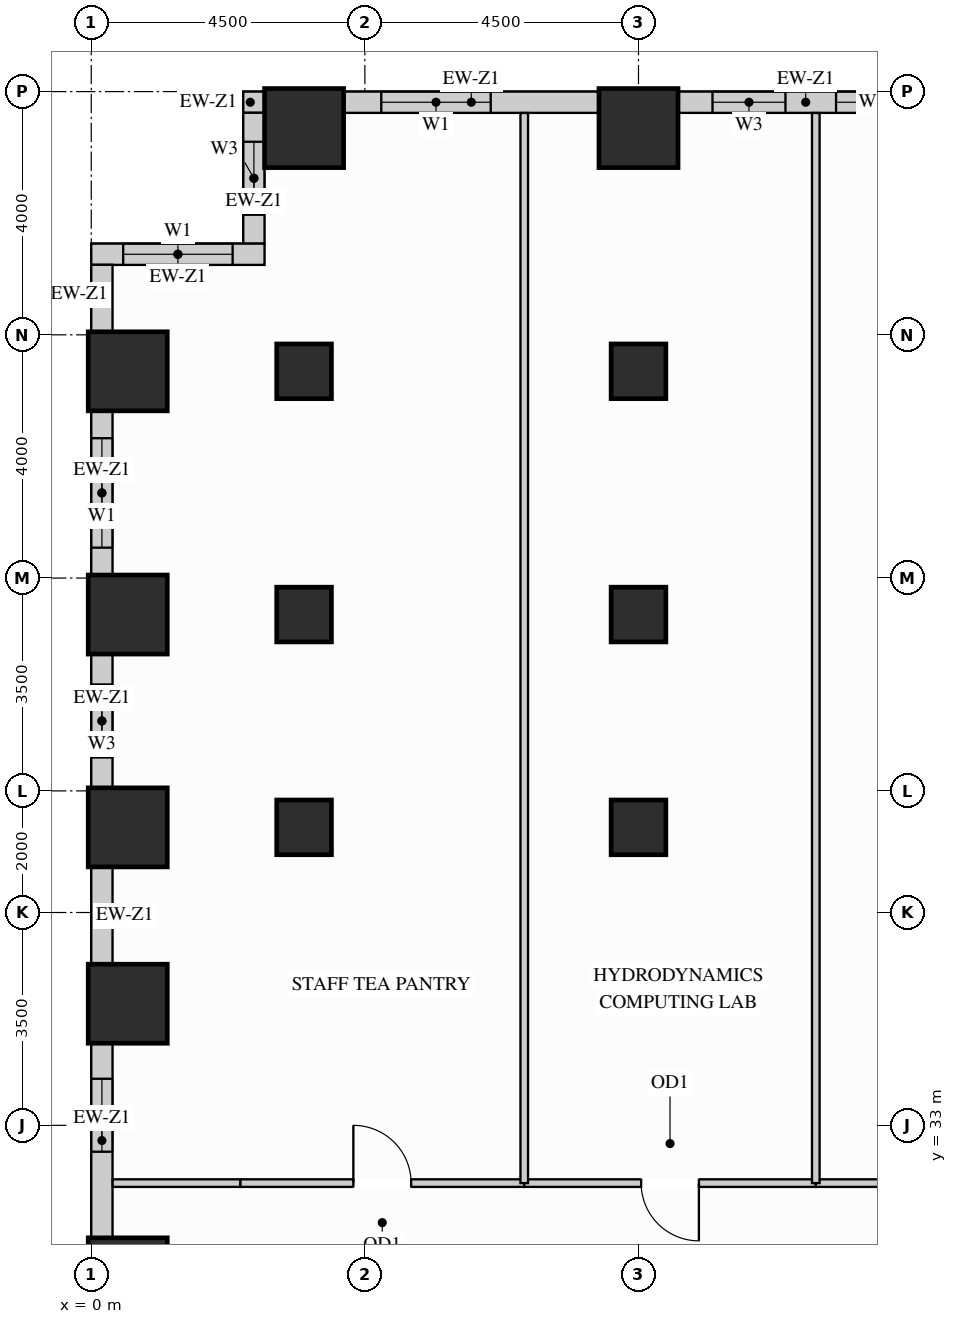
"""IFC4 building model, lengths in metres.
Left out: names, types, materials, properties, quantities, classifications, styles, units other than length and angle.
Written with IfcOpenShell. Run it as: python <this file> out.ifc"""

import sys

from ifc_helpers import new_model, si_unit, direction, frame, frame_2d, origin, origin_2d, place, context, subcontext, project, spatial, rectangle, extrude, source, transform, mapped, element, fill, save


model = new_model("IFC4")
c1 = context("Model", 3, precision=1e-05, world=origin(), true_north=direction((0.0, 1.0)))
c2 = subcontext(c1, "Body", "Model", "MODEL_VIEW")
j1 = project(units=[si_unit("LENGTHUNIT", "METRE"), si_unit("PLANEANGLEUNIT", "RADIAN")], contexts=[c1])
p1 = place(None, origin())
s1 = spatial("IfcSite", under=j1, at=p1, CompositionType="ELEMENT")
p2 = place(p1, origin())
s2 = spatial("IfcBuilding", under=s1, at=p2, CompositionType="ELEMENT")
p3 = place(p2, frame((0.0, 0.0, 36.9)))
s3 = spatial("IfcBuildingStorey", under=s2, at=p3, CompositionType="ELEMENT", Elevation=36.9)
m1 = source(origin(), c2, "Body", "SweptSolid", [
    extrude(rectangle(XDim=0.9, YDim=0.9, at=origin_2d()), origin(), (0.0, 0.0, 1.0), 3.38),
])
for number, where, z_axis, x_axis in (
    (1, (3.5, 37.9, 0.0), (0.0, 0.0, 1.0), (1.0, 0.0, 0.0)),
    (2, (3.5, 41.4, 0.0), (0.0, 0.0, 1.0), (1.0, 0.0, 0.0)),
    (3, (3.5, 45.4, 0.0), (0.0, 0.0, 1.0), (1.0, 0.0, 0.0)),
    (4, (9.0, 37.9, 0.0), (0.0, 0.0, 1.0), (1.0, 0.0, 0.0)),
    (5, (9.0, 41.4, 0.0), (0.0, 0.0, 1.0), (1.0, 0.0, 0.0)),
    (6, (9.0, 45.4, 0.0), (0.0, 0.0, 1.0), (1.0, 0.0, 0.0)),
):
    element("IfcColumn", number, at=place(p3, frame(where, z_axis=z_axis, x_axis=x_axis)), inside=s3, PredefinedType="COLUMN", context=c2, shape_type="MappedRepresentation", body=[
        mapped(m1, transform((0.0, 0.0, 0.0), x_axis=(1.0, 0.0, 0.0), y_axis=(0.0, 1.0, 0.0), z_axis=(0.0, 0.0, 1.0))),
    ])
m2 = source(origin(), c2, "Body", "SweptSolid", [
    extrude(rectangle(XDim=1.3, YDim=1.3, at=origin_2d()), origin(), (0.0, 0.0, 1.0), 3.38),
])
for number, where, z_axis, x_axis in (
    (7, (3.5, 49.4, 0.0), (0.0, 0.0, 1.0), (1.0, 0.0, 0.0)),
    (8, (9.0, 49.4, 0.0), (0.0, 0.0, 1.0), (1.0, 0.0, 0.0)),
    (9, (0.6, 30.5, 0.0), (0.0, 0.0, 1.0), (1.0, 0.0, 0.0)),
    (10, (0.6, 35.0, 0.0), (0.0, 0.0, 1.0), (1.0, 0.0, 0.0)),
    (11, (0.6, 37.9, 0.0), (0.0, 0.0, 1.0), (1.0, 0.0, 0.0)),
    (12, (0.6, 41.4, 0.0), (0.0, 0.0, 1.0), (1.0, 0.0, 0.0)),
    (13, (0.6, 45.4, 0.0), (0.0, 0.0, 1.0), (1.0, 0.0, 0.0)),
):
    element("IfcColumn", number, at=place(p3, frame(where, z_axis=z_axis, x_axis=x_axis)), inside=s3, PredefinedType="COLUMN", context=c2, shape_type="MappedRepresentation", body=[
        mapped(m2, transform((0.0, 0.0, 0.0), x_axis=(1.0, 0.0, 0.0), y_axis=(0.0, 1.0, 0.0), z_axis=(0.0, 0.0, 1.0))),
    ])
p4 = place(p3, frame((13.852, 49.825, 0.0), z_axis=(0.0, 0.0, 1.0), x_axis=(-1.0, 0.0, 0.0)))
e14 = element("IfcWall", 14, at=p4, inside=s3, PredefinedType="SOLIDWALL", context=c2, shape_type="SweptSolid", body=[
    extrude(rectangle(XDim=4.204, YDim=0.35, at=frame_2d((2.102, 0.0))), origin(), (0.0, 0.0, 1.0), 2.51),
])
p5 = place(p4, frame((0.403, 0.0, 0.78)))
e15 = element("IfcOpeningElement", 15, at=p5, cuts=e14, PredefinedType="OPENING", context=c2, shape_type="SweptSolid", body=[
    extrude(rectangle(XDim=1.2, YDim=1.55, at=frame_2d((0.6, 0.775))), frame((0.0, 0.185, 0.0), z_axis=(0.0, -1.0, 0.0), x_axis=(1.0, 0.0, 0.0)), (0.0, 0.0, 1.0), 0.37),
])
p6 = place(p4, frame((2.435, 0.0, 0.78)))
e16 = element("IfcOpeningElement", 16, at=p6, cuts=e14, PredefinedType="OPENING", context=c2, shape_type="SweptSolid", body=[
    extrude(rectangle(XDim=1.2, YDim=1.55, at=frame_2d((0.6, 0.775))), frame((0.0, 0.185, 0.0), z_axis=(0.0, -1.0, 0.0), x_axis=(1.0, 0.0, 0.0)), (0.0, 0.0, 1.0), 0.37),
])
p7 = place(p3, frame((8.352, 49.825, 0.0), z_axis=(0.0, 0.0, 1.0), x_axis=(-1.0, 0.0, 0.0)))
e17 = element("IfcWall", 17, at=p7, inside=s3, PredefinedType="SOLIDWALL", context=c2, shape_type="SweptSolid", body=[
    extrude(rectangle(XDim=4.204, YDim=0.35, at=frame_2d((2.102, 0.0))), origin(), (0.0, 0.0, 1.0), 2.51),
])
p8 = place(p7, frame((1.782, 0.0, 0.78)))
e18 = element("IfcOpeningElement", 18, at=p8, cuts=e17, PredefinedType="OPENING", context=c2, shape_type="SweptSolid", body=[
    extrude(rectangle(XDim=1.8, YDim=1.55, at=frame_2d((0.9, 0.775))), frame((0.0, 0.185, 0.0), z_axis=(0.0, -1.0, 0.0), x_axis=(1.0, 0.0, 0.0)), (0.0, 0.0, 1.0), 0.37),
])
m3 = source(origin(), c2, "Body", "SweptSolid", [
    extrude(rectangle(XDim=0.352, YDim=0.35, at=frame_2d((0.176, 0.0))), origin(), (0.0, 0.0, 1.0), 3.365),
])
p9 = place(p3, frame((2.852, 49.825, 0.0), z_axis=(0.0, 0.0, 1.0), x_axis=(-1.0, 0.0, 0.0)))
e19 = element("IfcWall", 19, at=p9, inside=s3, PredefinedType="SOLIDWALL", context=c2, shape_type="MappedRepresentation", body=[
    mapped(m3, transform((0.0, 0.0, 0.0), x_axis=(1.0, 0.0, 0.0), y_axis=(0.0, 1.0, 0.0), z_axis=(0.0, 0.0, 1.0))),
])
p10 = place(p3, frame((2.675, 49.652, 0.0), z_axis=(0.0, 0.0, 1.0), x_axis=(0.0, -1.0, 0.0)))
e20 = element("IfcWall", 20, at=p10, inside=s3, PredefinedType="SOLIDWALL", context=c2, shape_type="SweptSolid", body=[
    extrude(rectangle(XDim=2.154, YDim=0.35, at=frame_2d((1.077, 0.0))), origin(), (0.0, 0.0, 1.0), 3.365),
])
p11 = place(p10, frame((0.477, 0.0, 0.78)))
e21 = element("IfcOpeningElement", 21, at=p11, cuts=e20, PredefinedType="OPENING", context=c2, shape_type="SweptSolid", body=[
    extrude(rectangle(XDim=1.2, YDim=2.1, at=frame_2d((0.6, 1.05))), frame((0.0, 0.185, 0.0), z_axis=(0.0, -1.0, 0.0), x_axis=(1.0, 0.0, 0.0)), (0.0, 0.0, 1.0), 0.37),
])
p12 = place(p3, frame((2.85, 47.325, 0.0), z_axis=(0.0, 0.0, 1.0), x_axis=(-1.0, 0.0, 0.0)))
e22 = element("IfcWall", 22, at=p12, inside=s3, PredefinedType="SOLIDWALL", context=c2, shape_type="SweptSolid", body=[
    extrude(rectangle(XDim=2.85, YDim=0.35, at=frame_2d((1.425, 0.0))), origin(), (0.0, 0.0, 1.0), 3.365),
])
p13 = place(p12, frame((0.525, 0.0, 0.78)))
e23 = element("IfcOpeningElement", 23, at=p13, cuts=e22, PredefinedType="OPENING", context=c2, shape_type="SweptSolid", body=[
    extrude(rectangle(XDim=1.8, YDim=2.1, at=frame_2d((0.9, 1.05))), frame((0.0, 0.185, 0.0), z_axis=(0.0, -1.0, 0.0), x_axis=(1.0, 0.0, 0.0)), (0.0, 0.0, 1.0), 0.37),
])
m4 = source(origin(), c2, "Body", "SweptSolid", [
    extrude(rectangle(XDim=1.104, YDim=0.35, at=frame_2d((0.552, 0.0))), origin(), (0.0, 0.0, 1.0), 3.365),
])
p14 = place(p3, frame((0.175, 47.152, 0.0), z_axis=(0.0, 0.0, 1.0), x_axis=(0.0, -1.0, 0.0)))
e24 = element("IfcWall", 24, at=p14, inside=s3, PredefinedType="SOLIDWALL", context=c2, shape_type="MappedRepresentation", body=[
    mapped(m4, transform((0.0, 0.0, 0.0), x_axis=(1.0, 0.0, 0.0), y_axis=(0.0, 1.0, 0.0), z_axis=(0.0, 0.0, 1.0))),
])
p15 = place(p3, frame((0.175, 44.752, 0.0), z_axis=(0.0, 0.0, 1.0), x_axis=(0.0, -1.0, 0.0)))
e25 = element("IfcWall", 25, at=p15, inside=s3, PredefinedType="SOLIDWALL", context=c2, shape_type="SweptSolid", body=[
    extrude(rectangle(XDim=2.704, YDim=0.35, at=frame_2d((1.352, 0.0))), origin(), (0.0, 0.0, 1.0), 2.51),
])
p16 = place(p15, frame((0.452, 0.0, 0.78)))
e26 = element("IfcOpeningElement", 26, at=p16, cuts=e25, PredefinedType="OPENING", context=c2, shape_type="SweptSolid", body=[
    extrude(rectangle(XDim=1.8, YDim=1.55, at=frame_2d((0.9, 0.775))), frame((0.0, 0.185, 0.0), z_axis=(0.0, -1.0, 0.0), x_axis=(1.0, 0.0, 0.0)), (0.0, 0.0, 1.0), 0.37),
])
p17 = place(p3, frame((0.175, 40.752, 0.0), z_axis=(0.0, 0.0, 1.0), x_axis=(0.0, -1.0, 0.0)))
e27 = element("IfcWall", 27, at=p17, inside=s3, PredefinedType="SOLIDWALL", context=c2, shape_type="SweptSolid", body=[
    extrude(rectangle(XDim=2.204, YDim=0.35, at=frame_2d((1.102, 0.0))), origin(), (0.0, 0.0, 1.0), 2.51),
])
p18 = place(p17, frame((0.502, 0.0, 0.78)))
e28 = element("IfcOpeningElement", 28, at=p18, cuts=e27, PredefinedType="OPENING", context=c2, shape_type="SweptSolid", body=[
    extrude(rectangle(XDim=1.2, YDim=1.55, at=frame_2d((0.6, 0.775))), frame((0.0, 0.185, 0.0), z_axis=(0.0, -1.0, 0.0), x_axis=(1.0, 0.0, 0.0)), (0.0, 0.0, 1.0), 0.37),
])
m5 = source(origin(), c2, "Body", "SweptSolid", [
    extrude(rectangle(XDim=1.604, YDim=0.35, at=frame_2d((0.802, 0.0))), origin(), (0.0, 0.0, 1.0), 2.51),
])
p19 = place(p3, frame((0.175, 37.252, 0.0), z_axis=(0.0, 0.0, 1.0), x_axis=(0.0, -1.0, 0.0)))
e29 = element("IfcWall", 29, at=p19, inside=s3, PredefinedType="SOLIDWALL", context=c2, shape_type="MappedRepresentation", body=[
    mapped(m5, transform((0.0, 0.0, 0.0), x_axis=(1.0, 0.0, 0.0), y_axis=(0.0, 1.0, 0.0), z_axis=(0.0, 0.0, 1.0))),
])
p20 = place(p3, frame((0.175, 34.352, 0.0), z_axis=(0.0, 0.0, 1.0), x_axis=(0.0, -1.0, 0.0)))
e30 = element("IfcWall", 30, at=p20, inside=s3, PredefinedType="SOLIDWALL", context=c2, shape_type="SweptSolid", body=[
    extrude(rectangle(XDim=3.204, YDim=0.35, at=frame_2d((1.602, 0.0))), origin(), (0.0, 0.0, 1.0), 2.51),
])
p21 = place(p20, frame((0.586, 0.0, 0.78)))
e31 = element("IfcOpeningElement", 31, at=p21, cuts=e30, PredefinedType="OPENING", context=c2, shape_type="SweptSolid", body=[
    extrude(rectangle(XDim=1.2, YDim=1.55, at=frame_2d((0.6, 0.775))), frame((0.0, 0.185, 0.0), z_axis=(0.0, -1.0, 0.0), x_axis=(1.0, 0.0, 0.0)), (0.0, 0.0, 1.0), 0.37),
])
p22 = place(p3, frame((2.45, 32.05, 0.0), z_axis=(0.0, 0.0, 1.0), x_axis=(1.0, 0.0, 0.0)))
e32 = element("IfcWall", 32, at=p22, inside=s3, PredefinedType="PARTITIONING", context=c2, shape_type="SweptSolid", body=[
    extrude(rectangle(XDim=4.671, YDim=0.125, at=frame_2d((2.335, 0.0))), origin(), (0.0, 0.0, 1.0), 3.365),
])
p23 = place(p22, frame((1.861, 0.0, 0.0)))
e33 = element("IfcOpeningElement", 33, at=p23, cuts=e32, PredefinedType="OPENING", context=c2, shape_type="SweptSolid", body=[
    extrude(rectangle(XDim=0.95, YDim=2.15, at=frame_2d((0.475, 1.075))), frame((0.0, 0.073, 0.0), z_axis=(0.0, -1.0, 0.0), x_axis=(1.0, 0.0, 0.0)), (0.0, 0.0, 1.0), 0.145),
])
p24 = place(p3, frame((7.121, 32.05, 0.0), z_axis=(0.0, 0.0, 1.0), x_axis=(1.0, 0.0, 0.0)))
e34 = element("IfcWall", 34, at=p24, inside=s3, PredefinedType="PARTITIONING", context=c2, shape_type="SweptSolid", body=[
    extrude(rectangle(XDim=4.795, YDim=0.125, at=frame_2d((2.397, 0.0))), origin(), (0.0, 0.0, 1.0), 3.365),
])
p25 = place(p24, frame((1.923, 0.0, 0.0)))
e35 = element("IfcOpeningElement", 35, at=p25, cuts=e34, PredefinedType="OPENING", context=c2, shape_type="SweptSolid", body=[
    extrude(rectangle(XDim=0.95, YDim=2.15, at=frame_2d((0.475, 1.075))), frame((0.0, 0.073, 0.0), z_axis=(0.0, -1.0, 0.0), x_axis=(1.0, 0.0, 0.0)), (0.0, 0.0, 1.0), 0.145),
])
p26 = place(p3, frame((11.916, 32.05, 0.0), z_axis=(0.0, 0.0, 1.0), x_axis=(1.0, 0.0, 0.0)))
e36 = element("IfcWall", 36, at=p26, inside=s3, PredefinedType="PARTITIONING", context=c2, shape_type="SweptSolid", body=[
    extrude(rectangle(XDim=4.634, YDim=0.125, at=frame_2d((2.317, 0.0))), origin(), (0.0, 0.0, 1.0), 3.365),
])
p27 = place(p26, frame((1.842, 0.0, 0.0)))
e37 = element("IfcOpeningElement", 37, at=p27, cuts=e36, PredefinedType="OPENING", context=c2, shape_type="SweptSolid", body=[
    extrude(rectangle(XDim=0.95, YDim=2.15, at=frame_2d((0.475, 1.075))), frame((0.0, 0.073, 0.0), z_axis=(0.0, -1.0, 0.0), x_axis=(1.0, 0.0, 0.0)), (0.0, 0.0, 1.0), 0.145),
])
m6 = source(origin(), c2, "Body", "SweptSolid", [
    extrude(rectangle(XDim=2.098, YDim=0.125, at=frame_2d((1.049, 0.0))), origin(), (0.0, 0.0, 1.0), 3.365),
])
p28 = place(p3, frame((0.352, 32.05, 0.0), z_axis=(0.0, 0.0, 1.0), x_axis=(1.0, 0.0, 0.0)))
e38 = element("IfcWall", 38, at=p28, inside=s3, PredefinedType="PARTITIONING", context=c2, shape_type="MappedRepresentation", body=[
    mapped(m6, transform((0.0, 0.0, 0.0), x_axis=(1.0, 0.0, 0.0), y_axis=(0.0, 1.0, 0.0), z_axis=(0.0, 0.0, 1.0))),
])
m7 = source(origin(), c2, "Body", "SweptSolid", [
    extrude(rectangle(XDim=17.598, YDim=0.125, at=frame_2d((8.799, 0.0))), origin(), (0.0, 0.0, 1.0), 3.365),
])
for number, where, z_axis, x_axis in (
    (39, (7.121, 32.05, 0.0), (0.0, 0.0, 1.0), (0.0, 1.0, 0.0)),
    (40, (11.916, 32.05, 0.0), (0.0, 0.0, 1.0), (0.0, 1.0, 0.0)),
):
    element("IfcWall", number, at=place(p3, frame(where, z_axis=z_axis, x_axis=x_axis)), inside=s3, PredefinedType="PARTITIONING", context=c2, shape_type="MappedRepresentation", body=[
        mapped(m7, transform((0.0, 0.0, 0.0), x_axis=(1.0, 0.0, 0.0), y_axis=(0.0, 1.0, 0.0), z_axis=(0.0, 0.0, 1.0))),
    ])
m8 = source(origin(), c2, "Body", "SweptSolid", [
    extrude(rectangle(XDim=0.95, YDim=2.15, at=frame_2d((0.475, 1.075))), frame((0.0, 0.025, 0.0), z_axis=(0.0, -1.0, 0.0), x_axis=(1.0, 0.0, 0.0)), (0.0, 0.0, 1.0), 0.05),
])
p29 = place(p23, origin())
e41 = element("IfcDoor", 41, at=p29, inside=s3, OperationType="SINGLE_SWING_LEFT", PredefinedType="DOOR", context=c2, shape_type="MappedRepresentation", body=[
    mapped(m8, transform((0.0, 0.0, 0.0), x_axis=(1.0, 0.0, 0.0), y_axis=(0.0, 1.0, 0.0), z_axis=(0.0, 0.0, 1.0))),
])
fill(e33, e41)
p30 = place(p25, origin())
e42 = element("IfcDoor", 42, at=p30, inside=s3, OperationType="SINGLE_SWING_RIGHT", PredefinedType="DOOR", context=c2, shape_type="MappedRepresentation", body=[
    mapped(m8, transform((0.0, 0.0, 0.0), x_axis=(1.0, 0.0, 0.0), y_axis=(0.0, 1.0, 0.0), z_axis=(0.0, 0.0, 1.0))),
])
fill(e35, e42)
m9 = source(origin(), c2, "Body", "SweptSolid", [
    extrude(rectangle(XDim=1.8, YDim=1.55, at=frame_2d((0.9, 0.775))), frame((0.0, 0.03, 0.0), z_axis=(0.0, -1.0, 0.0), x_axis=(1.0, 0.0, 0.0)), (0.0, 0.0, 1.0), 0.06),
])
p31 = place(p8, origin())
e43 = element("IfcWindow", 43, at=p31, inside=s3, PartitioningType="SINGLE_PANEL", PredefinedType="WINDOW", context=c2, shape_type="MappedRepresentation", body=[
    mapped(m9, transform((0.0, 0.0, 0.0), x_axis=(1.0, 0.0, 0.0), y_axis=(0.0, 1.0, 0.0), z_axis=(0.0, 0.0, 1.0))),
])
fill(e18, e43)
m10 = source(origin(), c2, "Body", "SweptSolid", [
    extrude(rectangle(XDim=1.8, YDim=2.1, at=frame_2d((0.9, 1.05))), frame((0.0, 0.03, 0.0), z_axis=(0.0, -1.0, 0.0), x_axis=(1.0, 0.0, 0.0)), (0.0, 0.0, 1.0), 0.06),
])
p32 = place(p13, origin())
e44 = element("IfcWindow", 44, at=p32, inside=s3, PartitioningType="SINGLE_PANEL", PredefinedType="WINDOW", context=c2, shape_type="MappedRepresentation", body=[
    mapped(m10, transform((0.0, 0.0, 0.0), x_axis=(1.0, 0.0, 0.0), y_axis=(0.0, 1.0, 0.0), z_axis=(0.0, 0.0, 1.0))),
])
fill(e23, e44)
p33 = place(p16, origin())
e45 = element("IfcWindow", 45, at=p33, inside=s3, PartitioningType="SINGLE_PANEL", PredefinedType="WINDOW", context=c2, shape_type="MappedRepresentation", body=[
    mapped(m9, transform((0.0, 0.0, 0.0), x_axis=(1.0, 0.0, 0.0), y_axis=(0.0, 1.0, 0.0), z_axis=(0.0, 0.0, 1.0))),
])
fill(e26, e45)
m11 = source(origin(), c2, "Body", "SweptSolid", [
    extrude(rectangle(XDim=1.2, YDim=1.55, at=frame_2d((0.6, 0.775))), frame((0.0, 0.03, 0.0), z_axis=(0.0, -1.0, 0.0), x_axis=(1.0, 0.0, 0.0)), (0.0, 0.0, 1.0), 0.06),
])
p34 = place(p5, origin())
e46 = element("IfcWindow", 46, at=p34, inside=s3, PartitioningType="SINGLE_PANEL", PredefinedType="WINDOW", context=c2, shape_type="MappedRepresentation", body=[
    mapped(m11, transform((0.0, 0.0, 0.0), x_axis=(1.0, 0.0, 0.0), y_axis=(0.0, 1.0, 0.0), z_axis=(0.0, 0.0, 1.0))),
])
fill(e15, e46)
p35 = place(p6, origin())
e47 = element("IfcWindow", 47, at=p35, inside=s3, PartitioningType="SINGLE_PANEL", PredefinedType="WINDOW", context=c2, shape_type="MappedRepresentation", body=[
    mapped(m11, transform((0.0, 0.0, 0.0), x_axis=(1.0, 0.0, 0.0), y_axis=(0.0, 1.0, 0.0), z_axis=(0.0, 0.0, 1.0))),
])
fill(e16, e47)
m12 = source(origin(), c2, "Body", "SweptSolid", [
    extrude(rectangle(XDim=1.2, YDim=2.1, at=frame_2d((0.6, 1.05))), frame((0.0, 0.03, 0.0), z_axis=(0.0, -1.0, 0.0), x_axis=(1.0, 0.0, 0.0)), (0.0, 0.0, 1.0), 0.06),
])
p36 = place(p11, origin())
e48 = element("IfcWindow", 48, at=p36, inside=s3, PartitioningType="SINGLE_PANEL", PredefinedType="WINDOW", context=c2, shape_type="MappedRepresentation", body=[
    mapped(m12, transform((0.0, 0.0, 0.0), x_axis=(1.0, 0.0, 0.0), y_axis=(0.0, 1.0, 0.0), z_axis=(0.0, 0.0, 1.0))),
])
fill(e21, e48)
p37 = place(p18, origin())
e49 = element("IfcWindow", 49, at=p37, inside=s3, PartitioningType="SINGLE_PANEL", PredefinedType="WINDOW", context=c2, shape_type="MappedRepresentation", body=[
    mapped(m11, transform((0.0, 0.0, 0.0), x_axis=(1.0, 0.0, 0.0), y_axis=(0.0, 1.0, 0.0), z_axis=(0.0, 0.0, 1.0))),
])
fill(e28, e49)
p38 = place(p21, origin())
e50 = element("IfcWindow", 50, at=p38, inside=s3, PartitioningType="SINGLE_PANEL", PredefinedType="WINDOW", context=c2, shape_type="MappedRepresentation", body=[
    mapped(m11, transform((0.0, 0.0, 0.0), x_axis=(1.0, 0.0, 0.0), y_axis=(0.0, 1.0, 0.0), z_axis=(0.0, 0.0, 1.0))),
])
fill(e31, e50)
save(model, sys.argv[1])
